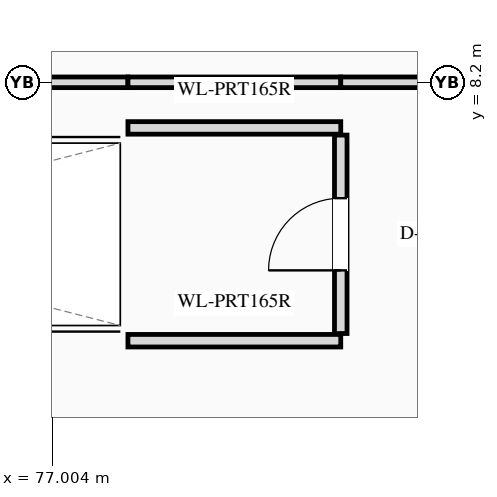
"""IFC4 building model, lengths in metres.
Left out: names, types, materials, properties, quantities, classifications, styles, units other than length and angle.
Written with IfcOpenShell. Run it as: python <this file> out.ifc"""

import sys

from ifc_helpers import new_model, si_unit, direction, frame, frame_2d, origin, place, context, subcontext, project, spatial, rectangle, extrude, element, fill, save


model = new_model("IFC4")
c1 = context("Model", 3, precision=1e-05, world=origin(), true_north=direction((0.0, 1.0)))
c2 = subcontext(c1, "Body", "Model", "MODEL_VIEW")
j1 = project(units=[si_unit("LENGTHUNIT", "METRE"), si_unit("PLANEANGLEUNIT", "RADIAN")], contexts=[c1])
p1 = place(None, origin())
s1 = spatial("IfcSite", under=j1, at=p1, CompositionType="ELEMENT")
p2 = place(p1, origin())
s2 = spatial("IfcBuilding", under=s1, at=p2, CompositionType="ELEMENT")
p3 = place(p2, frame((0.0, 0.0, 5.4)))
s3 = spatial("IfcBuildingStorey", under=s2, at=p3, CompositionType="ELEMENT", Elevation=5.4)
p4 = place(p3, frame((78.0, 4.8, 0.0), z_axis=(0.0, 0.0, 1.0), x_axis=(1.0, 0.0, 0.0)))
e1 = element("IfcWall", 1, at=p4, inside=s3, PredefinedType="PARTITIONING", context=c2, shape_type="SweptSolid", body=[
    extrude(rectangle(XDim=2.8, YDim=0.165, at=frame_2d((1.4, 0.0))), origin(), (0.0, 0.0, 1.0), 4.703),
])
p5 = place(p3, frame((78.0, 7.6, 0.0), z_axis=(0.0, 0.0, 1.0), x_axis=(1.0, 0.0, 0.0)))
e2 = element("IfcWall", 2, at=p5, inside=s3, PredefinedType="PARTITIONING", context=c2, shape_type="SweptSolid", body=[
    extrude(rectangle(XDim=2.8, YDim=0.165, at=frame_2d((1.4, 0.0))), origin(), (0.0, 0.0, 1.0), 5.095),
])
p6 = place(p3, frame((34.6, 8.2, 0.0), z_axis=(0.0, 0.0, 1.0), x_axis=(1.0, 0.0, 0.0)))
e3 = element("IfcWall", 3, at=p6, inside=s3, PredefinedType="PARTITIONING", context=c2, shape_type="SweptSolid", body=[
    extrude(rectangle(XDim=43.4, YDim=0.14, at=frame_2d((21.7, 0.0))), origin(), (0.0, 0.0, 1.0), 4.424),
])
p7 = place(p6, frame((18.6, 0.0, 0.0)))
e4 = element("IfcOpeningElement", 4, at=p7, cuts=e3, PredefinedType="OPENING", context=c2, shape_type="SweptSolid", body=[
    extrude(rectangle(XDim=1.6, YDim=2.4, at=frame_2d((0.8, 1.2))), frame((0.0, 0.08, 0.0), z_axis=(0.0, -1.0, 0.0), x_axis=(1.0, 0.0, 0.0)), (0.0, 0.0, 1.0), 0.16),
])
p8 = place(p3, frame((78.0, 8.2, 0.0), z_axis=(0.0, 0.0, 1.0), x_axis=(1.0, 0.0, 0.0)))
e5 = element("IfcWall", 5, at=p8, inside=s3, PredefinedType="PARTITIONING", context=c2, shape_type="SweptSolid", body=[
    extrude(rectangle(XDim=2.8, YDim=0.14, at=frame_2d((1.4, 0.0))), origin(), (0.0, 0.0, 1.0), 4.508),
])
p9 = place(p3, frame((80.8, 8.2, 0.0), z_axis=(0.0, 0.0, 1.0), x_axis=(1.0, 0.0, 0.0)))
e6 = element("IfcWall", 6, at=p9, inside=s3, PredefinedType="PARTITIONING", context=c2, shape_type="SweptSolid", body=[
    extrude(rectangle(XDim=10.0, YDim=0.14, at=frame_2d((5.0, 0.0))), origin(), (0.0, 0.0, 1.0), 4.424),
])
p10 = place(p3, frame((80.8, 4.895, 0.0), z_axis=(0.0, 0.0, 1.0), x_axis=(0.0, 1.0, 0.0)))
e7 = element("IfcWall", 7, at=p10, inside=s3, PredefinedType="PARTITIONING", context=c2, shape_type="SweptSolid", body=[
    extrude(rectangle(XDim=2.611, YDim=0.165, at=frame_2d((1.306, 0.0))), origin(), (0.0, 0.0, 1.0), 4.703),
])
p11 = place(p10, frame((0.831, 0.0, 0.0)))
e8 = element("IfcOpeningElement", 8, at=p11, cuts=e7, PredefinedType="OPENING", context=c2, shape_type="SweptSolid", body=[
    extrude(rectangle(XDim=0.95, YDim=2.15, at=frame_2d((0.475, 1.075))), frame((0.0, 0.093, 0.0), z_axis=(0.0, -1.0, 0.0), x_axis=(1.0, 0.0, 0.0)), (0.0, 0.0, 1.0), 0.185),
])
p12 = place(p11, origin())
e9 = element("IfcDoor", 9, at=p12, inside=s3, OperationType="SINGLE_SWING_LEFT", PredefinedType="DOOR", context=c2, shape_type="SweptSolid", body=[
    extrude(rectangle(XDim=0.95, YDim=2.15, at=frame_2d((0.475, 1.075))), frame((0.0, 0.025, 0.0), z_axis=(0.0, -1.0, 0.0), x_axis=(1.0, 0.0, 0.0)), (0.0, 0.0, 1.0), 0.05),
])
fill(e8, e9)
save(model, sys.argv[1])
